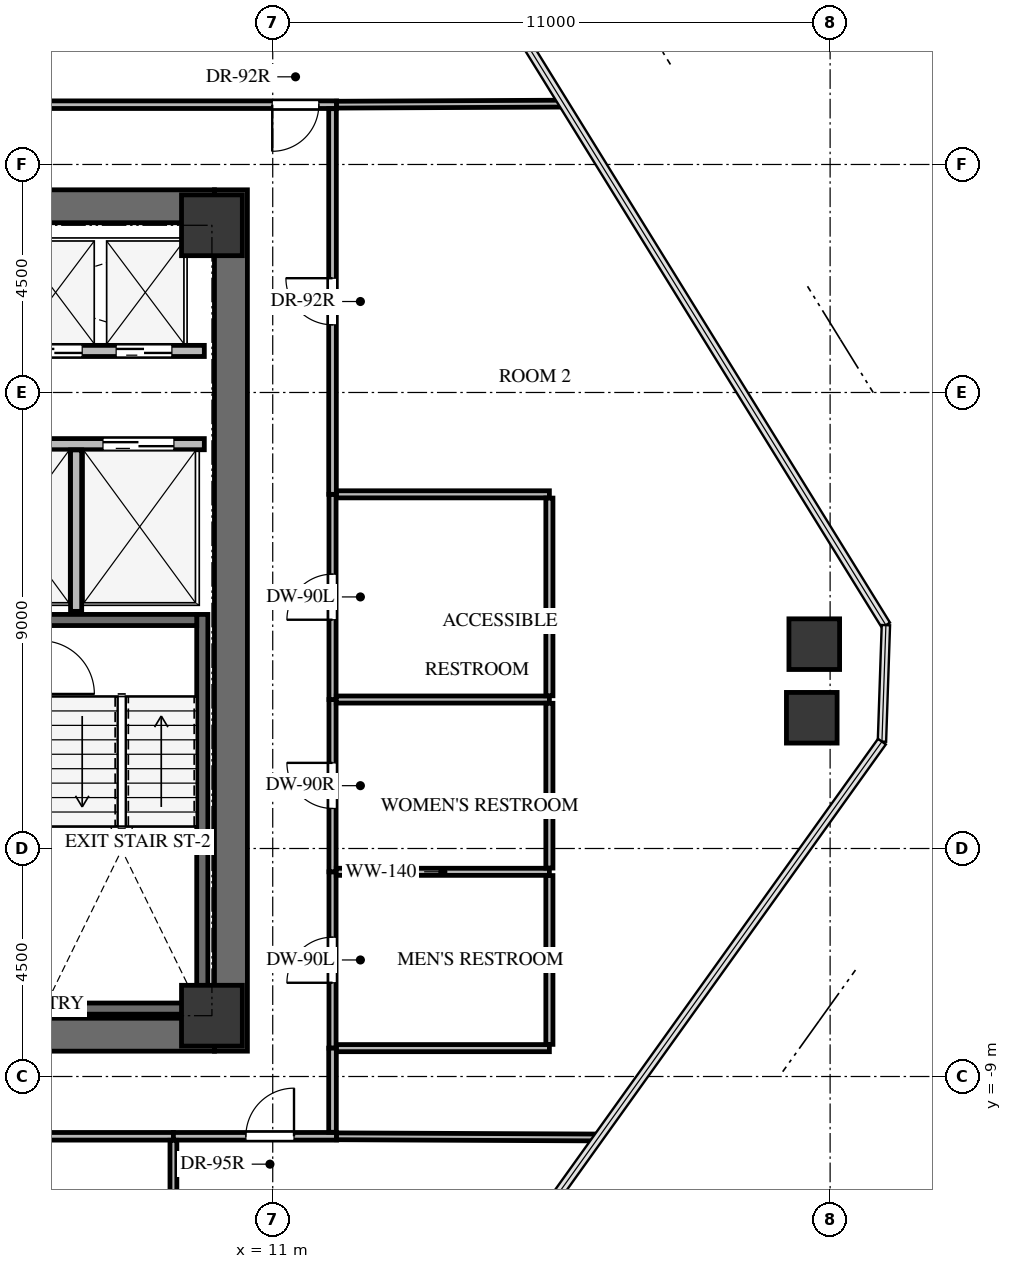
"""IFC4 building model, lengths in metres.
Left out: names, types, materials, properties, quantities, classifications, styles, units other than length and angle.
Written with IfcOpenShell. Run it as: python <this file> out.ifc"""

import sys

from ifc_helpers import new_model, si_unit, direction, frame, frame_2d, origin, origin_2d, place, context, subcontext, project, spatial, rectangle, extrude, source, transform, mapped, element, fill, save


model = new_model("IFC4")
c1 = context("Model", 3, precision=1e-05, world=origin(), true_north=direction((0.0, 1.0)))
c2 = subcontext(c1, "Body", "Model", "MODEL_VIEW")
j1 = project(units=[si_unit("LENGTHUNIT", "METRE"), si_unit("PLANEANGLEUNIT", "RADIAN")], contexts=[c1])
p1 = place(None, origin())
s1 = spatial("IfcSite", under=j1, at=p1, CompositionType="ELEMENT")
p2 = place(p1, origin())
s2 = spatial("IfcBuilding", under=s1, at=p2, CompositionType="ELEMENT")
p3 = place(p2, frame((0.0, 0.0, 196.9)))
s3 = spatial("IfcBuildingStorey", under=s2, at=p3, CompositionType="ELEMENT", Elevation=196.9)
p4 = place(p3, frame((10.175, -8.5, 0.0), z_axis=(0.0, 0.0, 1.0), x_axis=(0.0, 1.0, 0.0)))
e1 = element("IfcWall", 1, at=p4, inside=s3, PredefinedType="SHEAR", context=c2, shape_type="SweptSolid", body=[
    extrude(rectangle(XDim=17.0, YDim=0.65, at=frame_2d((8.5, 0.0))), origin(), (0.0, 0.0, 1.0), 3.3),
])
p5 = place(p3, frame((2.1, -8.175, 0.0), z_axis=(0.0, 0.0, 1.0), x_axis=(1.0, 0.0, 0.0)))
e2 = element("IfcWall", 2, at=p5, inside=s3, PredefinedType="SHEAR", context=c2, shape_type="SweptSolid", body=[
    extrude(rectangle(XDim=7.75, YDim=0.65, at=frame_2d((3.875, 0.0))), origin(), (0.0, 0.0, 1.0), 3.3),
])
p6 = place(p3, frame((-9.85, 8.175, 0.0), z_axis=(0.0, 0.0, 1.0), x_axis=(1.0, 0.0, 0.0)))
e3 = element("IfcWall", 3, at=p6, inside=s3, PredefinedType="SHEAR", context=c2, shape_type="SweptSolid", body=[
    extrude(rectangle(XDim=19.7, YDim=0.65, at=frame_2d((9.85, 0.0))), origin(), (0.0, 0.0, 1.0), 3.3),
])
p7 = place(p3, frame((9.61, -7.77, -0.24), z_axis=(0.0, 0.0, 1.0), x_axis=(0.0, 1.0, 0.0)))
e4 = element("IfcWall", 4, at=p7, inside=s3, PredefinedType="SHEAR", context=c2, shape_type="SweptSolid", body=[
    extrude(rectangle(XDim=7.89, YDim=0.22, at=frame_2d((3.945, 0.0))), origin(), (0.0, 0.0, 1.0), 3.3),
])
for number, where, z_axis, x_axis in (
    (5, (6.54, -7.66, -0.24), (0.0, 0.0, 1.0), (1.0, 0.0, 0.0)),
    (6, (9.5, 0.01, -0.24), (0.0, 0.0, 1.0), (-1.0, 0.0, 0.0)),
):
    element("IfcWall", number, at=place(p3, frame(where, z_axis=z_axis, x_axis=x_axis)), inside=s3, PredefinedType="SHEAR", context=c2, shape_type="SweptSolid", body=[
        extrude(rectangle(XDim=2.96, YDim=0.22, at=frame_2d((1.48, 0.0))), origin(), (0.0, 0.0, 1.0), 3.3),
    ])
m1 = source(origin(), c2, "Body", "SweptSolid", [
    extrude(rectangle(XDim=1.2, YDim=1.2, at=origin_2d()), origin(), (0.0, 0.0, 1.0), 3.3),
])
for number, where, z_axis, x_axis in (
    (7, (9.8, -7.8, -0.24), (0.0, 0.0, 1.0), (1.0, 0.0, 0.0)),
    (8, (9.8, 7.8, -0.24), (0.0, 0.0, 1.0), (1.0, 0.0, 0.0)),
):
    element("IfcColumn", number, at=place(p3, frame(where, z_axis=z_axis, x_axis=x_axis)), inside=s3, PredefinedType="COLUMN", context=c2, shape_type="MappedRepresentation", body=[
        mapped(m1, transform((0.0, 0.0, 0.0), x_axis=(1.0, 0.0, 0.0), y_axis=(0.0, 1.0, 0.0), z_axis=(0.0, 0.0, 1.0), scale=1.0)),
    ])
m2 = source(origin(), c2, "Body", "SweptSolid", [
    extrude(rectangle(XDim=1.0, YDim=1.0, at=origin_2d()), origin(), (0.0, 0.0, 1.0), 3.3),
])
for number, where, z_axis, x_axis in (
    (9, (21.687, -0.467, -0.24), (0.0, 0.0, 1.0), (1.0, 0.0, 0.0)),
    (10, (21.638, -1.92, -0.24), (0.0, 0.0, 1.0), (1.0, 0.0, 0.0)),
):
    element("IfcColumn", number, at=place(p3, frame(where, z_axis=z_axis, x_axis=x_axis)), inside=s3, PredefinedType="COLUMN", context=c2, shape_type="MappedRepresentation", body=[
        mapped(m2, transform((0.0, 0.0, 0.0), x_axis=(1.0, 0.0, 0.0), y_axis=(0.0, 1.0, 0.0), z_axis=(0.0, 0.0, 1.0), scale=1.0)),
    ])
p8 = place(p3, frame((4.6, 3.48, 0.0), z_axis=(0.0, 0.0, 1.0), x_axis=(1.0, 0.0, 0.0)))
e11 = element("IfcWall", 11, at=p8, inside=s3, PredefinedType="SOLIDWALL", context=c2, shape_type="SweptSolid", body=[
    extrude(rectangle(XDim=5.05, YDim=0.22, at=frame_2d((2.525, 0.0))), origin(), (0.0, 0.0, 1.0), 3.045),
])
p9 = place(p8, frame((0.55, 0.0, 0.0)))
e12 = element("IfcOpeningElement", 12, at=p9, cuts=e11, PredefinedType="OPENING", context=c2, shape_type="SweptSolid", body=[
    extrude(rectangle(XDim=1.4, YDim=2.15, at=frame_2d((0.7, 1.075))), frame((0.0, 0.12, 0.0), z_axis=(0.0, -1.0, 0.0), x_axis=(1.0, 0.0, 0.0)), (0.0, 0.0, 1.0), 0.24),
])
p10 = place(p8, frame((3.05, 0.0, 0.0)))
e13 = element("IfcOpeningElement", 13, at=p10, cuts=e11, PredefinedType="OPENING", context=c2, shape_type="SweptSolid", body=[
    extrude(rectangle(XDim=1.4, YDim=2.15, at=frame_2d((0.7, 1.075))), frame((0.0, 0.12, 0.0), z_axis=(0.0, -1.0, 0.0), x_axis=(1.0, 0.0, 0.0)), (0.0, 0.0, 1.0), 0.24),
])
p11 = place(p3, frame((7.12, 0.18, 0.0), z_axis=(0.0, 0.0, 1.0), x_axis=(0.0, 1.0, 0.0)))
e14 = element("IfcWall", 14, at=p11, inside=s3, PredefinedType="SOLIDWALL", context=c2, shape_type="SweptSolid", body=[
    extrude(rectangle(XDim=3.186, YDim=0.22, at=frame_2d((1.593, 0.0))), origin(), (0.0, 0.0, 1.0), 3.045),
])
p12 = place(p3, frame((2.325, 5.32, 0.0), z_axis=(0.0, 0.0, 1.0), x_axis=(1.0, 0.0, 0.0)))
e15 = element("IfcWall", 15, at=p12, inside=s3, PredefinedType="SOLIDWALL", context=c2, shape_type="SweptSolid", body=[
    extrude(rectangle(XDim=7.325, YDim=0.22, at=frame_2d((3.663, 0.0))), origin(), (0.0, 0.0, 1.0), 3.045),
])
p13 = place(p12, frame((0.275, 0.0, 0.0)))
e16 = element("IfcOpeningElement", 16, at=p13, cuts=e15, PredefinedType="OPENING", context=c2, shape_type="SweptSolid", body=[
    extrude(rectangle(XDim=1.1, YDim=2.15, at=frame_2d((0.55, 1.075))), frame((0.0, 0.12, 0.0), z_axis=(0.0, -1.0, 0.0), x_axis=(1.0, 0.0, 0.0)), (0.0, 0.0, 1.0), 0.24),
])
p14 = place(p12, frame((2.045, 0.0, 0.0)))
e17 = element("IfcOpeningElement", 17, at=p14, cuts=e15, PredefinedType="OPENING", context=c2, shape_type="SweptSolid", body=[
    extrude(rectangle(XDim=1.1, YDim=2.15, at=frame_2d((0.55, 1.075))), frame((0.0, 0.12, 0.0), z_axis=(0.0, -1.0, 0.0), x_axis=(1.0, 0.0, 0.0)), (0.0, 0.0, 1.0), 0.24),
])
p15 = place(p12, frame((3.815, 0.0, 0.0)))
e18 = element("IfcOpeningElement", 18, at=p15, cuts=e15, PredefinedType="OPENING", context=c2, shape_type="SweptSolid", body=[
    extrude(rectangle(XDim=1.1, YDim=2.15, at=frame_2d((0.55, 1.075))), frame((0.0, 0.12, 0.0), z_axis=(0.0, -1.0, 0.0), x_axis=(1.0, 0.0, 0.0)), (0.0, 0.0, 1.0), 0.24),
])
p16 = place(p12, frame((5.585, 0.0, 0.0)))
e19 = element("IfcOpeningElement", 19, at=p16, cuts=e15, PredefinedType="OPENING", context=c2, shape_type="SweptSolid", body=[
    extrude(rectangle(XDim=1.1, YDim=2.15, at=frame_2d((0.55, 1.075))), frame((0.0, 0.12, 0.0), z_axis=(0.0, -1.0, 0.0), x_axis=(1.0, 0.0, 0.0)), (0.0, 0.0, 1.0), 0.24),
])
p17 = place(p3, frame((12.18, -8.44, 0.0), z_axis=(0.0, 0.0, 1.0), x_axis=(0.0, 1.0, 0.0)))
e20 = element("IfcWall", 20, at=p17, inside=s3, PredefinedType="PARTITIONING", context=c2, shape_type="SweptSolid", body=[
    extrude(rectangle(XDim=3.48, YDim=0.14, at=frame_2d((1.74, 0.0))), origin(), (0.0, 0.0, 1.0), 3.045),
])
p18 = place(p17, frame((1.29, 0.0, 0.0)))
e21 = element("IfcOpeningElement", 21, at=p18, cuts=e20, PredefinedType="OPENING", context=c2, shape_type="SweptSolid", body=[
    extrude(rectangle(XDim=0.9, YDim=2.05, at=frame_2d((0.45, 1.025))), frame((0.0, 0.08, 0.0), z_axis=(0.0, -1.0, 0.0), x_axis=(1.0, 0.0, 0.0)), (0.0, 0.0, 1.0), 0.16),
])
p19 = place(p3, frame((12.18, -4.96, 0.0), z_axis=(0.0, 0.0, 1.0), x_axis=(0.0, 1.0, 0.0)))
e22 = element("IfcWall", 22, at=p19, inside=s3, PredefinedType="PARTITIONING", context=c2, shape_type="SweptSolid", body=[
    extrude(rectangle(XDim=3.4, YDim=0.14, at=frame_2d((1.7, 0.0))), origin(), (0.0, 0.0, 1.0), 3.045),
])
p20 = place(p19, frame((1.25, 0.0, 0.0)))
e23 = element("IfcOpeningElement", 23, at=p20, cuts=e22, PredefinedType="OPENING", context=c2, shape_type="SweptSolid", body=[
    extrude(rectangle(XDim=0.9, YDim=2.05, at=frame_2d((0.45, 1.025))), frame((0.0, 0.08, 0.0), z_axis=(0.0, -1.0, 0.0), x_axis=(1.0, 0.0, 0.0)), (0.0, 0.0, 1.0), 0.16),
])
p21 = place(p3, frame((12.18, -1.56, 0.0), z_axis=(0.0, 0.0, 1.0), x_axis=(0.0, 1.0, 0.0)))
e24 = element("IfcWall", 24, at=p21, inside=s3, PredefinedType="PARTITIONING", context=c2, shape_type="SweptSolid", body=[
    extrude(rectangle(XDim=4.05, YDim=0.14, at=frame_2d((2.025, 0.0))), origin(), (0.0, 0.0, 1.0), 2.242),
])
p22 = place(p21, frame((1.575, 0.0, 0.0)))
e25 = element("IfcOpeningElement", 25, at=p22, cuts=e24, PredefinedType="OPENING", context=c2, shape_type="SweptSolid", body=[
    extrude(rectangle(XDim=0.9, YDim=2.05, at=frame_2d((0.45, 1.025))), frame((0.0, 0.08, 0.0), z_axis=(0.0, -1.0, 0.0), x_axis=(1.0, 0.0, 0.0)), (0.0, 0.0, 1.0), 0.16),
])
p23 = place(p3, frame((12.26, 10.18, 0.0), z_axis=(0.0, 0.0, 1.0), x_axis=(-1.0, 0.0, 0.0)))
e26 = element("IfcWall", 26, at=p23, inside=s3, PredefinedType="PARTITIONING", context=c2, shape_type="SweptSolid", body=[
    extrude(rectangle(XDim=6.72, YDim=0.15, at=frame_2d((3.36, 0.0))), origin(), (0.0, 0.0, 1.0), 2.242),
])
p24 = place(p23, frame((0.35, 0.0, 0.0)))
e27 = element("IfcOpeningElement", 27, at=p24, cuts=e26, PredefinedType="OPENING", context=c2, shape_type="SweptSolid", body=[
    extrude(rectangle(XDim=0.92, YDim=2.1, at=frame_2d((0.46, 1.05))), frame((0.0, 0.085, 0.0), z_axis=(0.0, -1.0, 0.0), x_axis=(1.0, 0.0, 0.0)), (0.0, 0.0, 1.0), 0.17),
])
p25 = place(p3, frame((1.46, -10.18, 0.0), z_axis=(0.0, 0.0, 1.0), x_axis=(1.0, 0.0, 0.0)))
e28 = element("IfcWall", 28, at=p25, inside=s3, PredefinedType="PARTITIONING", context=c2, shape_type="SweptSolid", body=[
    extrude(rectangle(XDim=7.58, YDim=0.15, at=frame_2d((3.79, 0.0))), origin(), (0.0, 0.0, 1.0), 2.242),
])
p26 = place(p25, frame((3.33, 0.0, 0.0)))
e29 = element("IfcOpeningElement", 29, at=p26, cuts=e28, PredefinedType="OPENING", context=c2, shape_type="SweptSolid", body=[
    extrude(rectangle(XDim=0.92, YDim=2.1, at=frame_2d((0.46, 1.05))), frame((0.0, 0.085, 0.0), z_axis=(0.0, -1.0, 0.0), x_axis=(1.0, 0.0, 0.0)), (0.0, 0.0, 1.0), 0.17),
])
p27 = place(p3, frame((9.04, -10.18, 0.0), z_axis=(0.0, 0.0, 1.0), x_axis=(1.0, 0.0, 0.0)))
e30 = element("IfcWall", 30, at=p27, inside=s3, PredefinedType="PARTITIONING", context=c2, shape_type="SweptSolid", body=[
    extrude(rectangle(XDim=3.22, YDim=0.15, at=frame_2d((1.61, 0.0))), origin(), (0.0, 0.0, 1.0), 3.045),
])
p28 = place(p27, frame((1.43, 0.0, 0.0)))
e31 = element("IfcOpeningElement", 31, at=p28, cuts=e30, PredefinedType="OPENING", context=c2, shape_type="SweptSolid", body=[
    extrude(rectangle(XDim=0.95, YDim=2.1, at=frame_2d((0.475, 1.05))), frame((0.0, 0.085, 0.0), z_axis=(0.0, -1.0, 0.0), x_axis=(1.0, 0.0, 0.0)), (0.0, 0.0, 1.0), 0.17),
])
p29 = place(p3, frame((12.18, 2.49, 0.0), z_axis=(0.0, 0.0, 1.0), x_axis=(0.0, 1.0, 0.0)))
e32 = element("IfcWall", 32, at=p29, inside=s3, PredefinedType="PARTITIONING", context=c2, shape_type="SweptSolid", body=[
    extrude(rectangle(XDim=7.611, YDim=0.15, at=frame_2d((3.806, 0.0))), origin(), (0.0, 0.0, 1.0), 3.045),
])
p30 = place(p29, frame((3.345, 0.0, 0.0)))
e33 = element("IfcOpeningElement", 33, at=p30, cuts=e32, PredefinedType="OPENING", context=c2, shape_type="SweptSolid", body=[
    extrude(rectangle(XDim=0.92, YDim=2.1, at=frame_2d((0.46, 1.05))), frame((0.0, 0.085, 0.0), z_axis=(0.0, -1.0, 0.0), x_axis=(1.0, 0.0, 0.0)), (0.0, 0.0, 1.0), 0.17),
])
p31 = place(p3, frame((12.18, -10.101, 0.0), z_axis=(0.0, 0.0, 1.0), x_axis=(0.0, 1.0, 0.0)))
e34 = element("IfcWall", 34, at=p31, inside=s3, PredefinedType="PARTITIONING", context=c2, shape_type="SweptSolid", body=[
    extrude(rectangle(XDim=1.661, YDim=0.15, at=frame_2d((0.831, 0.0))), origin(), (0.0, 0.0, 1.0), 3.045),
])
p32 = place(p3, frame((12.254, -4.96, 0.0), z_axis=(0.0, 0.0, 1.0), x_axis=(1.0, 0.0, 0.0)))
e35 = element("IfcWall", 35, at=p32, inside=s3, PredefinedType="PARTITIONING", context=c2, shape_type="SweptSolid", body=[
    extrude(rectangle(XDim=4.206, YDim=0.14, at=frame_2d((2.103, 0.0))), origin(), (0.0, 0.0, 1.0), 3.045),
])
p33 = place(p3, frame((16.46, -8.44, 0.0), z_axis=(0.0, 0.0, 1.0), x_axis=(-1.0, 0.0, 0.0)))
e36 = element("IfcWall", 36, at=p33, inside=s3, PredefinedType="PARTITIONING", context=c2, shape_type="SweptSolid", body=[
    extrude(rectangle(XDim=4.201, YDim=0.14, at=frame_2d((2.101, 0.0))), origin(), (0.0, 0.0, 1.0), 3.045),
])
p34 = place(p3, frame((16.46, -5.034, 0.0), z_axis=(0.0, 0.0, 1.0), x_axis=(0.0, -1.0, 0.0)))
e37 = element("IfcWall", 37, at=p34, inside=s3, PredefinedType="PARTITIONING", context=c2, shape_type="SweptSolid", body=[
    extrude(rectangle(XDim=3.332, YDim=0.14, at=frame_2d((1.666, 0.0))), origin(), (0.0, 0.0, 1.0), 3.045),
])
p35 = place(p3, frame((12.254, -1.56, 0.0), z_axis=(0.0, 0.0, 1.0), x_axis=(1.0, 0.0, 0.0)))
e38 = element("IfcWall", 38, at=p35, inside=s3, PredefinedType="PARTITIONING", context=c2, shape_type="SweptSolid", body=[
    extrude(rectangle(XDim=4.206, YDim=0.14, at=frame_2d((2.103, 0.0))), origin(), (0.0, 0.0, 1.0), 3.045),
])
p36 = place(p3, frame((16.46, -1.634, 0.0), z_axis=(0.0, 0.0, 1.0), x_axis=(0.0, -1.0, 0.0)))
e39 = element("IfcWall", 39, at=p36, inside=s3, PredefinedType="PARTITIONING", context=c2, shape_type="SweptSolid", body=[
    extrude(rectangle(XDim=3.252, YDim=0.14, at=frame_2d((1.626, 0.0))), origin(), (0.0, 0.0, 1.0), 3.045),
])
p37 = place(p3, frame((12.259, 2.49, 0.0), z_axis=(0.0, 0.0, 1.0), x_axis=(1.0, 0.0, 0.0)))
e40 = element("IfcWall", 40, at=p37, inside=s3, PredefinedType="PARTITIONING", context=c2, shape_type="SweptSolid", body=[
    extrude(rectangle(XDim=4.201, YDim=0.14, at=frame_2d((2.101, 0.0))), origin(), (0.0, 0.0, 1.0), 3.045),
])
p38 = place(p3, frame((16.46, 2.416, 0.0), z_axis=(0.0, 0.0, 1.0), x_axis=(0.0, -1.0, 0.0)))
e41 = element("IfcWall", 41, at=p38, inside=s3, PredefinedType="PARTITIONING", context=c2, shape_type="SweptSolid", body=[
    extrude(rectangle(XDim=3.902, YDim=0.14, at=frame_2d((1.951, 0.0))), origin(), (0.0, 0.0, 1.0), 2.242),
])
p39 = place(p3, frame((16.74, 10.201, 0.0), z_axis=(0.0, 0.0, 1.0), x_axis=(-0.999989522694, -0.004577608714, 0.0)))
e42 = element("IfcWall", 42, at=p39, inside=s3, PredefinedType="PARTITIONING", context=c2, shape_type="SweptSolid", body=[
    extrude(rectangle(XDim=4.48, YDim=0.135, at=frame_2d((2.24, 0.0))), origin(), (0.0, 0.0, 1.0), 2.399),
])
p40 = place(p3, frame((9.04, -10.259, 0.0), z_axis=(0.0, 0.0, 1.0), x_axis=(0.0, -1.0, 0.0)))
e43 = element("IfcWall", 43, at=p40, inside=s3, PredefinedType="PARTITIONING", context=c2, shape_type="SweptSolid", body=[
    extrude(rectangle(XDim=3.67, YDim=0.135, at=frame_2d((1.835, 0.0))), origin(), (0.0, 0.0, 1.0), 2.242),
])
p41 = place(p3, frame((12.26, -10.18, 0.0), z_axis=(0.0, 0.0, 1.0), x_axis=(0.999990144117, -0.004439782427, 0.0)))
e44 = element("IfcWall", 44, at=p41, inside=s3, PredefinedType="PARTITIONING", context=c2, shape_type="SweptSolid", body=[
    extrude(rectangle(XDim=5.169, YDim=0.135, at=frame_2d((2.584, 0.0))), origin(), (0.0, 0.0, 1.0), 2.399),
])
m3 = source(origin(), c2, "Body", "SweptSolid", [
    extrude(rectangle(XDim=1.4, YDim=2.15, at=frame_2d((0.7, 1.075))), frame((0.0, 0.025, 0.0), z_axis=(0.0, -1.0, 0.0), x_axis=(1.0, 0.0, 0.0)), (0.0, 0.0, 1.0), 0.05),
])
p42 = place(p10, origin())
e45 = element("IfcDoor", 45, at=p42, inside=s3, OperationType="DOUBLE_DOOR_SLIDING", PredefinedType="DOOR", context=c2, shape_type="MappedRepresentation", body=[
    mapped(m3, transform((0.0, 0.0, 0.0), x_axis=(1.0, 0.0, 0.0), y_axis=(0.0, 1.0, 0.0), z_axis=(0.0, 0.0, 1.0), scale=1.0)),
])
fill(e13, e45)
m4 = source(origin(), c2, "Body", "SweptSolid", [
    extrude(rectangle(XDim=1.1, YDim=2.15, at=frame_2d((0.55, 1.075))), frame((0.0, 0.025, 0.0), z_axis=(0.0, -1.0, 0.0), x_axis=(1.0, 0.0, 0.0)), (0.0, 0.0, 1.0), 0.05),
])
p43 = place(p15, origin())
e46 = element("IfcDoor", 46, at=p43, inside=s3, OperationType="DOUBLE_DOOR_SLIDING", PredefinedType="DOOR", context=c2, shape_type="MappedRepresentation", body=[
    mapped(m4, transform((0.0, 0.0, 0.0), x_axis=(1.0, 0.0, 0.0), y_axis=(0.0, 1.0, 0.0), z_axis=(0.0, 0.0, 1.0), scale=1.0)),
])
fill(e18, e46)
p44 = place(p16, origin())
e47 = element("IfcDoor", 47, at=p44, inside=s3, OperationType="DOUBLE_DOOR_SLIDING", PredefinedType="DOOR", context=c2, shape_type="MappedRepresentation", body=[
    mapped(m4, transform((0.0, 0.0, 0.0), x_axis=(1.0, 0.0, 0.0), y_axis=(0.0, 1.0, 0.0), z_axis=(0.0, 0.0, 1.0), scale=1.0)),
])
fill(e19, e47)
m5 = source(origin(), c2, "Body", "SweptSolid", [
    extrude(rectangle(XDim=0.9, YDim=2.05, at=frame_2d((0.45, 1.025))), frame((0.0, 0.025, 0.0), z_axis=(0.0, -1.0, 0.0), x_axis=(1.0, 0.0, 0.0)), (0.0, 0.0, 1.0), 0.05),
])
p45 = place(p18, origin())
e48 = element("IfcDoor", 48, at=p45, inside=s3, OperationType="SINGLE_SWING_LEFT", PredefinedType="DOOR", context=c2, shape_type="MappedRepresentation", body=[
    mapped(m5, transform((0.0, 0.0, 0.0), x_axis=(1.0, 0.0, 0.0), y_axis=(0.0, 1.0, 0.0), z_axis=(0.0, 0.0, 1.0), scale=1.0)),
])
fill(e21, e48)
m6 = source(origin(), c2, "Body", "SweptSolid", [
    extrude(rectangle(XDim=0.9, YDim=2.05, at=frame_2d((0.45, 1.025))), frame((0.0, 0.025, 0.0), z_axis=(0.0, -1.0, 0.0), x_axis=(1.0, 0.0, 0.0)), (0.0, 0.0, 1.0), 0.05),
])
p46 = place(p20, origin())
e49 = element("IfcDoor", 49, at=p46, inside=s3, OperationType="SINGLE_SWING_RIGHT", PredefinedType="DOOR", context=c2, shape_type="MappedRepresentation", body=[
    mapped(m6, transform((0.0, 0.0, 0.0), x_axis=(1.0, 0.0, 0.0), y_axis=(0.0, 1.0, 0.0), z_axis=(0.0, 0.0, 1.0), scale=1.0)),
])
fill(e23, e49)
p47 = place(p22, origin())
e50 = element("IfcDoor", 50, at=p47, inside=s3, OperationType="SINGLE_SWING_LEFT", PredefinedType="DOOR", context=c2, shape_type="MappedRepresentation", body=[
    mapped(m5, transform((0.0, 0.0, 0.0), x_axis=(1.0, 0.0, 0.0), y_axis=(0.0, 1.0, 0.0), z_axis=(0.0, 0.0, 1.0), scale=1.0)),
])
fill(e25, e50)
m7 = source(origin(), c2, "Body", "SweptSolid", [
    extrude(rectangle(XDim=0.92, YDim=2.1, at=frame_2d((0.46, 1.05))), frame((0.0, 0.025, 0.0), z_axis=(0.0, -1.0, 0.0), x_axis=(1.0, 0.0, 0.0)), (0.0, 0.0, 1.0), 0.05),
])
p48 = place(p24, origin())
e51 = element("IfcDoor", 51, at=p48, inside=s3, OperationType="SINGLE_SWING_RIGHT", PredefinedType="DOOR", context=c2, shape_type="MappedRepresentation", body=[
    mapped(m7, transform((0.0, 0.0, 0.0), x_axis=(1.0, 0.0, 0.0), y_axis=(0.0, 1.0, 0.0), z_axis=(0.0, 0.0, 1.0), scale=1.0)),
])
fill(e27, e51)
m8 = source(origin(), c2, "Body", "SweptSolid", [
    extrude(rectangle(XDim=0.95, YDim=2.1, at=frame_2d((0.475, 1.05))), frame((0.0, 0.025, 0.0), z_axis=(0.0, -1.0, 0.0), x_axis=(1.0, 0.0, 0.0)), (0.0, 0.0, 1.0), 0.05),
])
p49 = place(p28, origin())
e52 = element("IfcDoor", 52, at=p49, inside=s3, OperationType="SINGLE_SWING_RIGHT", PredefinedType="DOOR", context=c2, shape_type="MappedRepresentation", body=[
    mapped(m8, transform((0.0, 0.0, 0.0), x_axis=(1.0, 0.0, 0.0), y_axis=(0.0, 1.0, 0.0), z_axis=(0.0, 0.0, 1.0), scale=1.0)),
])
fill(e31, e52)
p50 = place(p30, origin())
e53 = element("IfcDoor", 53, at=p50, inside=s3, OperationType="SINGLE_SWING_RIGHT", PredefinedType="DOOR", context=c2, shape_type="MappedRepresentation", body=[
    mapped(m7, transform((0.0, 0.0, 0.0), x_axis=(1.0, 0.0, 0.0), y_axis=(0.0, 1.0, 0.0), z_axis=(0.0, 0.0, 1.0), scale=1.0)),
])
fill(e33, e53)
save(model, sys.argv[1])
